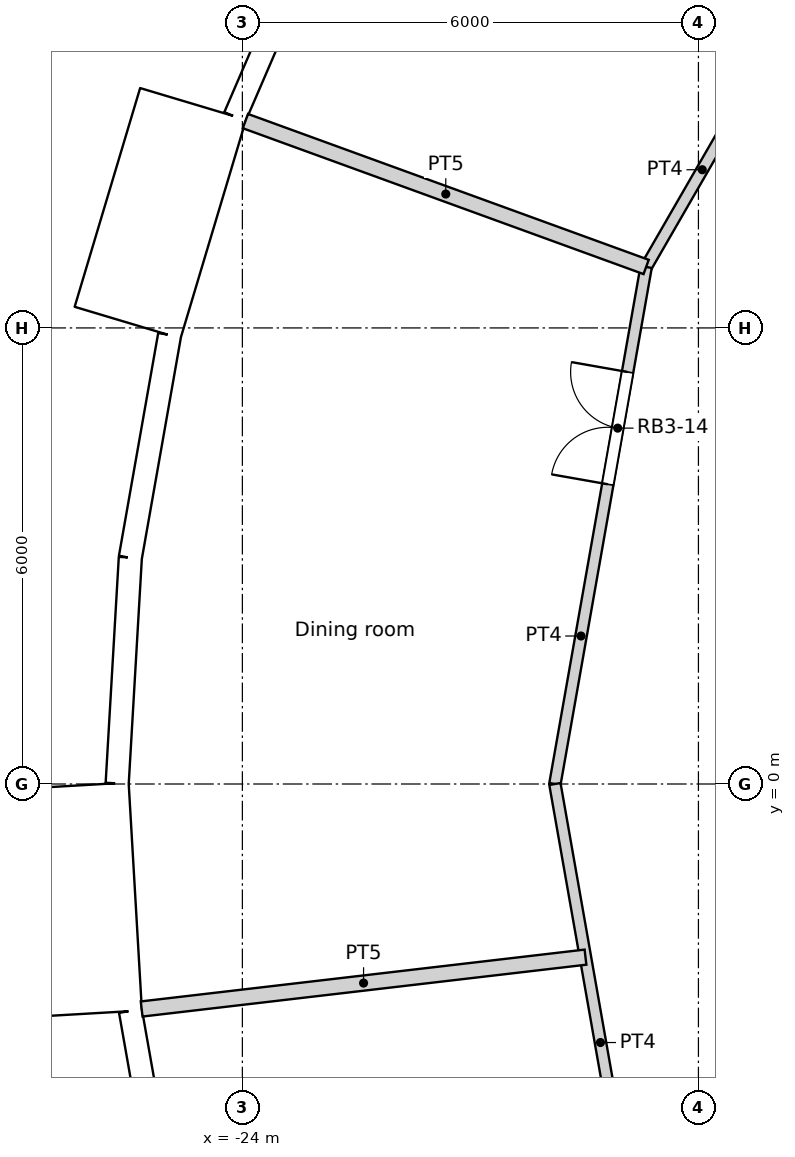
"""IFC4 building model, lengths in metres.
Left out: names, types, materials, properties, quantities, classifications, styles, units other than length and angle.
Written with IfcOpenShell. Run it as: python <this file> out.ifc"""

import sys

from ifc_helpers import new_model, si_unit, direction, frame, frame_2d, origin, origin_2d, place, context, subcontext, project, spatial, rectangle, circle, extrude, element, fill, save


model = new_model("IFC4")
c1 = context("Model", 3, precision=1e-05, world=origin(), true_north=direction((0.0, 1.0)))
c2 = subcontext(c1, "Body", "Model", "MODEL_VIEW")
j1 = project(units=[si_unit("LENGTHUNIT", "METRE"), si_unit("PLANEANGLEUNIT", "RADIAN")], contexts=[c1])
p1 = place(None, origin())
s1 = spatial("IfcSite", under=j1, at=p1, CompositionType="ELEMENT")
p2 = place(p1, origin())
s2 = spatial("IfcBuilding", under=s1, at=p2, CompositionType="ELEMENT")
p3 = place(p2, frame((0.0, 0.0, 147.6)))
s3 = spatial("IfcBuildingStorey", under=s2, at=p3, CompositionType="ELEMENT", Elevation=147.6)
for number, where, z_axis, x_axis in (
    (1, (-23.067, 8.396, 0.0), (0.0, 0.0, 1.0), (1.0, 0.0, 0.0)),
    (2, (-24.382, 2.85, 0.0), (0.0, 0.0, 1.0), (1.0, 0.0, 0.0)),
    (3, (-24.382, -2.85, 0.0), (0.0, 0.0, 1.0), (1.0, 0.0, 0.0)),
):
    element("IfcColumn", number, at=place(p3, frame(where, z_axis=z_axis, x_axis=x_axis)), inside=s3, PredefinedType="COLUMN", context=c2, shape_type="SweptSolid", body=[
        extrude(circle(Radius=0.6, at=origin_2d()), origin(), (0.0, 0.0, 1.0), 3.6),
    ])
for number, where, z_axis, x_axis in (
    (4, (-18.612, 2.805, 0.0), (0.0, 0.0, 1.0), (1.0, 0.0, 0.0)),
    (5, (-18.612, -2.805, 0.0), (0.0, 0.0, 1.0), (1.0, 0.0, 0.0)),
):
    element("IfcColumn", number, at=place(p3, frame(where, z_axis=z_axis, x_axis=x_axis)), inside=s3, PredefinedType="COLUMN", context=c2, shape_type="SweptSolid", body=[
        extrude(circle(Radius=0.65, at=origin_2d()), origin(), (0.0, 0.0, 1.0), 3.6),
    ])
p4 = place(p3, frame((-22.919, 11.51, 0.0), z_axis=(0.0, 0.0, 1.0), x_axis=(-0.396078892785, -0.918216483565, 0.0)))
e6 = element("IfcWall", 6, at=p4, inside=s3, PredefinedType="SOLIDWALL", context=c2, shape_type="SweptSolid", body=[
    extrude(rectangle(XDim=2.973, YDim=0.3, at=frame_2d((1.486, 0.0))), origin(), (0.0, 0.0, 1.0), 3.3),
])
p5 = place(p4, frame((1.486, 0.0, 1.55)))
e7 = element("IfcOpeningElement", 7, at=p5, cuts=e6, PredefinedType="OPENING", context=c2, shape_type="SweptSolid", body=[
    extrude(circle(Radius=0.9, at=origin_2d()), frame((0.0, 0.16, 0.0), z_axis=(0.0, -1.0, 0.0), x_axis=(1.0, 0.0, 0.0)), (0.0, 0.0, 1.0), 0.32),
])
p6 = place(p3, frame((-24.649, 8.945, -0.3), z_axis=(0.0, 0.0, 1.0), x_axis=(-0.286780420304, -0.957996341606, 0.0)))
e8 = element("IfcWall", 8, at=p6, inside=s3, PredefinedType="ELEMENTEDWALL", context=c2, shape_type="SweptSolid", body=[
    extrude(rectangle(XDim=3.0, YDim=1.45, at=frame_2d((1.5, 0.0))), origin(), (0.0, 0.0, 1.0), 3.6),
])
p7 = place(p6, frame((1.5, 0.0, 1.85)))
e9 = element("IfcOpeningElement", 9, at=p7, cuts=e8, PredefinedType="OPENING", context=c2, shape_type="SweptSolid", body=[
    extrude(circle(Radius=0.9, at=origin_2d()), frame((0.0, 0.735, 0.0), z_axis=(0.0, -1.0, 0.0), x_axis=(1.0, 0.0, 0.0)), (0.0, 0.0, 1.0), 1.47),
])
p8 = place(p3, frame((-24.958, 5.905, 0.0), z_axis=(0.0, 0.0, 1.0), x_axis=(-0.173686952598, -0.984800915159, 0.0)))
e10 = element("IfcWall", 10, at=p8, inside=s3, PredefinedType="SOLIDWALL", context=c2, shape_type="SweptSolid", body=[
    extrude(rectangle(XDim=2.973, YDim=0.3, at=frame_2d((1.486, 0.0))), origin(), (0.0, 0.0, 1.0), 3.3),
])
p9 = place(p8, frame((1.486, 0.0, 1.55)))
e11 = element("IfcOpeningElement", 11, at=p9, cuts=e10, PredefinedType="OPENING", context=c2, shape_type="SweptSolid", body=[
    extrude(circle(Radius=0.9, at=origin_2d()), frame((0.0, 0.16, 0.0), z_axis=(0.0, -1.0, 0.0), x_axis=(1.0, 0.0, 0.0)), (0.0, 0.0, 1.0), 0.32),
])
p10 = place(p3, frame((-25.474, 2.978, 0.0), z_axis=(0.0, 0.0, 1.0), x_axis=(-0.058139540521, -0.998308466271, 0.0)))
e12 = element("IfcWall", 12, at=p10, inside=s3, PredefinedType="SOLIDWALL", context=c2, shape_type="SweptSolid", body=[
    extrude(rectangle(XDim=2.973, YDim=0.3, at=frame_2d((1.487, 0.0))), origin(), (0.0, 0.0, 1.0), 3.3),
])
p11 = place(p10, frame((1.486, 0.0, 1.55)))
e13 = element("IfcOpeningElement", 13, at=p11, cuts=e12, PredefinedType="OPENING", context=c2, shape_type="SweptSolid", body=[
    extrude(circle(Radius=0.9, at=origin_2d()), frame((0.0, 0.16, 0.0), z_axis=(0.0, -1.0, 0.0), x_axis=(1.0, 0.0, 0.0)), (0.0, 0.0, 1.0), 0.32),
])
p12 = place(p3, frame((-26.222, -0.025, -0.3), z_axis=(0.0, 0.0, 1.0), x_axis=(0.058106596105, -0.998310384344, 0.0)))
e14 = element("IfcWall", 14, at=p12, inside=s3, PredefinedType="ELEMENTEDWALL", context=c2, shape_type="SweptSolid", body=[
    extrude(rectangle(XDim=3.0, YDim=1.45, at=frame_2d((1.5, 0.0))), origin(), (0.0, 0.0, 1.0), 3.6),
])
p13 = place(p12, frame((1.5, 0.0, 1.85)))
e15 = element("IfcOpeningElement", 15, at=p13, cuts=e14, PredefinedType="OPENING", context=c2, shape_type="SweptSolid", body=[
    extrude(circle(Radius=0.9, at=origin_2d()), frame((0.0, 0.735, 0.0), z_axis=(0.0, -1.0, 0.0), x_axis=(1.0, 0.0, 0.0)), (0.0, 0.0, 1.0), 1.47),
])
p14 = place(p3, frame((-25.472, -2.987, 0.0), z_axis=(0.0, 0.0, 1.0), x_axis=(0.173686952598, -0.984800915159, 0.0)))
e16 = element("IfcWall", 16, at=p14, inside=s3, PredefinedType="SOLIDWALL", context=c2, shape_type="SweptSolid", body=[
    extrude(rectangle(XDim=2.973, YDim=0.3, at=frame_2d((1.486, 0.0))), origin(), (0.0, 0.0, 1.0), 3.3),
])
p15 = place(p14, frame((1.486, 0.0, 1.55)))
e17 = element("IfcOpeningElement", 17, at=p15, cuts=e16, PredefinedType="OPENING", context=c2, shape_type="SweptSolid", body=[
    extrude(circle(Radius=0.9, at=origin_2d()), frame((0.0, 0.16, 0.0), z_axis=(0.0, -1.0, 0.0), x_axis=(1.0, 0.0, 0.0)), (0.0, 0.0, 1.0), 0.32),
])
p16 = place(p3, frame((-18.688, 6.802, 0.0), z_axis=(0.0, 0.0, 1.0), x_axis=(0.499914202267, 0.866074933462, 0.0)))
e18 = element("IfcWall", 18, at=p16, inside=s3, PredefinedType="PARTITIONING", context=c2, shape_type="SweptSolid", body=[
    extrude(rectangle(XDim=6.907, YDim=0.15, at=frame_2d((3.454, 0.0))), origin(), (0.0, 0.0, 1.0), 3.3),
])
p17 = place(p16, frame((3.004, 0.0, 0.0)))
e19 = element("IfcOpeningElement", 19, at=p17, cuts=e18, PredefinedType="OPENING", context=c2, shape_type="SweptSolid", body=[
    extrude(rectangle(XDim=1.0, YDim=2.04, at=frame_2d((0.5, 1.02))), frame((0.0, 0.075, 0.0), z_axis=(0.0, -1.0, 0.0), x_axis=(1.0, 0.0, 0.0)), (0.0, 0.0, 1.0), 0.15),
])
p18 = place(p3, frame((-19.888, 0.0, 0.0), z_axis=(0.0, 0.0, 1.0), x_axis=(0.173482860149, -0.984836888644, 0.0)))
e20 = element("IfcWall", 20, at=p18, inside=s3, PredefinedType="PARTITIONING", context=c2, shape_type="SweptSolid", body=[
    extrude(rectangle(XDim=6.907, YDim=0.15, at=frame_2d((3.454, 0.0))), origin(), (0.0, 0.0, 1.0), 3.3),
])
p19 = place(p3, frame((-19.888, 0.0, 0.0), z_axis=(0.0, 0.0, 1.0), x_axis=(0.173728873845, 0.98479352069, 0.0)))
e21 = element("IfcWall", 21, at=p19, inside=s3, PredefinedType="PARTITIONING", context=c2, shape_type="SweptSolid", body=[
    extrude(rectangle(XDim=6.907, YDim=0.15, at=frame_2d((3.454, 0.0))), origin(), (0.0, 0.0, 1.0), 3.3),
])
p20 = place(p19, frame((4.004, 0.0, 0.0)))
e22 = element("IfcOpeningElement", 22, at=p20, cuts=e21, PredefinedType="OPENING", context=c2, shape_type="SweptSolid", body=[
    extrude(rectangle(XDim=1.5, YDim=2.1, at=frame_2d((0.75, 1.05))), frame((0.0, 0.075, 0.0), z_axis=(0.0, -1.0, 0.0), x_axis=(1.0, 0.0, 0.0)), (0.0, 0.0, 1.0), 0.15),
])
p21 = place(p3, frame((-23.96, 8.721, 0.0), z_axis=(0.0, 0.0, 1.0), x_axis=(0.939686652043, -0.342036541866, 0.0)))
e23 = element("IfcWall", 23, at=p21, inside=s3, PredefinedType="PARTITIONING", context=c2, shape_type="SweptSolid", body=[
    extrude(rectangle(XDim=5.61, YDim=0.2, at=frame_2d((2.805, 0.0))), origin(), (0.0, 0.0, 1.0), 3.3),
])
p22 = place(p3, frame((-25.325, -2.96, 0.0), z_axis=(0.0, 0.0, 1.0), x_axis=(0.993249747924, 0.115995423397, 0.0)))
e24 = element("IfcWall", 24, at=p22, inside=s3, PredefinedType="PARTITIONING", context=c2, shape_type="SweptSolid", body=[
    extrude(rectangle(XDim=5.879, YDim=0.2, at=frame_2d((2.939, 0.0))), origin(), (0.0, 0.0, 1.0), 3.3),
])
p23 = place(p5, origin())
e25 = element("IfcWindow", 25, at=p23, inside=s3, PartitioningType="SINGLE_PANEL", PredefinedType="WINDOW", context=c2, shape_type="SweptSolid", body=[
    extrude(circle(Radius=0.9, at=origin_2d()), frame((0.0, 0.12, 0.0), z_axis=(0.0, -1.0, 0.0), x_axis=(1.0, 0.0, 0.0)), (0.0, 0.0, 1.0), 0.1),
])
fill(e7, e25)
p24 = place(p7, origin())
e26 = element("IfcWindow", 26, at=p24, inside=s3, PartitioningType="SINGLE_PANEL", PredefinedType="WINDOW", context=c2, shape_type="SweptSolid", body=[
    extrude(circle(Radius=0.9, at=origin_2d()), frame((0.0, 0.695, 0.0), z_axis=(0.0, -1.0, 0.0), x_axis=(1.0, 0.0, 0.0)), (0.0, 0.0, 1.0), 0.1),
])
fill(e9, e26)
p25 = place(p9, origin())
e27 = element("IfcWindow", 27, at=p25, inside=s3, PartitioningType="SINGLE_PANEL", PredefinedType="WINDOW", context=c2, shape_type="SweptSolid", body=[
    extrude(circle(Radius=0.9, at=origin_2d()), frame((0.0, 0.12, 0.0), z_axis=(0.0, -1.0, 0.0), x_axis=(1.0, 0.0, 0.0)), (0.0, 0.0, 1.0), 0.1),
])
fill(e11, e27)
p26 = place(p11, origin())
e28 = element("IfcWindow", 28, at=p26, inside=s3, PartitioningType="SINGLE_PANEL", PredefinedType="WINDOW", context=c2, shape_type="SweptSolid", body=[
    extrude(circle(Radius=0.9, at=origin_2d()), frame((0.0, 0.12, 0.0), z_axis=(0.0, -1.0, 0.0), x_axis=(1.0, 0.0, 0.0)), (0.0, 0.0, 1.0), 0.1),
])
fill(e13, e28)
p27 = place(p13, origin())
e29 = element("IfcWindow", 29, at=p27, inside=s3, PartitioningType="SINGLE_PANEL", PredefinedType="WINDOW", context=c2, shape_type="SweptSolid", body=[
    extrude(circle(Radius=0.9, at=origin_2d()), frame((0.0, 0.695, 0.0), z_axis=(0.0, -1.0, 0.0), x_axis=(1.0, 0.0, 0.0)), (0.0, 0.0, 1.0), 0.1),
])
fill(e15, e29)
p28 = place(p15, origin())
e30 = element("IfcWindow", 30, at=p28, inside=s3, PartitioningType="SINGLE_PANEL", PredefinedType="WINDOW", context=c2, shape_type="SweptSolid", body=[
    extrude(circle(Radius=0.9, at=origin_2d()), frame((0.0, 0.12, 0.0), z_axis=(0.0, -1.0, 0.0), x_axis=(1.0, 0.0, 0.0)), (0.0, 0.0, 1.0), 0.1),
])
fill(e17, e30)
p29 = place(p20, origin())
e31 = element("IfcDoor", 31, at=p29, inside=s3, OperationType="DOUBLE_DOOR_SINGLE_SWING", PredefinedType="DOOR", context=c2, shape_type="SweptSolid", body=[
    extrude(rectangle(XDim=1.5, YDim=2.1, at=frame_2d((0.75, 1.05))), frame((0.0, 0.025, 0.0), z_axis=(0.0, -1.0, 0.0), x_axis=(1.0, 0.0, 0.0)), (0.0, 0.0, 1.0), 0.05),
])
fill(e22, e31)
save(model, sys.argv[1])
